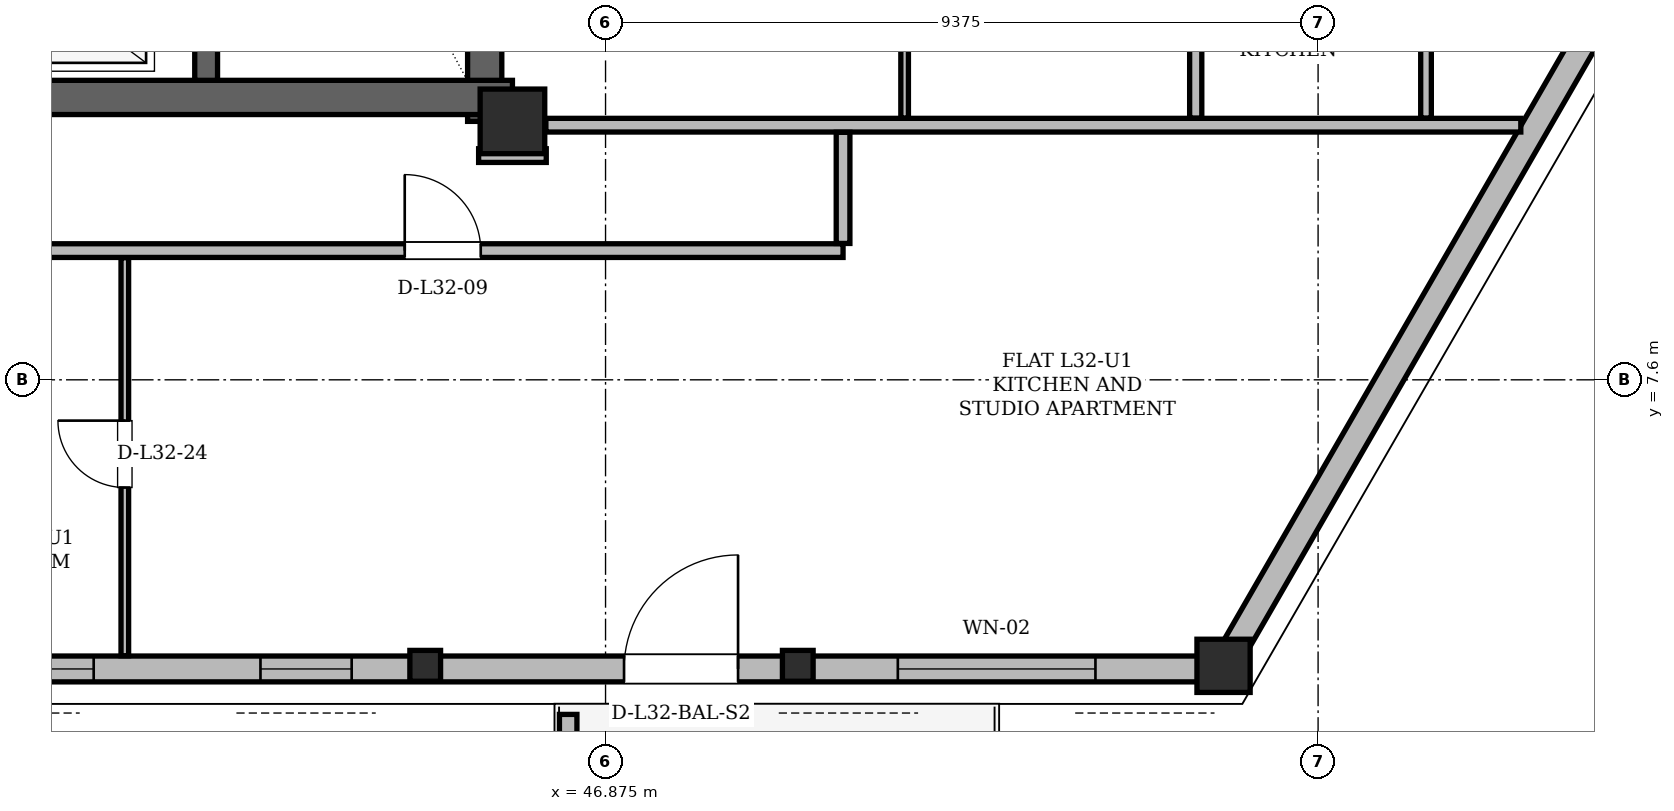
"""IFC4 building model, lengths in metres.
Left out: names, types, materials, properties, quantities, classifications, styles, units other than length and angle.
Written with IfcOpenShell. Run it as: python <this file> out.ifc"""

import sys

from ifc_helpers import new_model, si_unit, direction, frame, frame_2d, origin, origin_2d, place, context, subcontext, project, spatial, polyline, rectangle, hollow_rectangle, i_section, outline, extrude, element, fill, save


model = new_model("IFC4")
c1 = context("Model", 3, precision=1e-05, world=origin(), true_north=direction((0.0, 1.0)))
c2 = subcontext(c1, "Body", "Model", "MODEL_VIEW")
j1 = project(units=[si_unit("LENGTHUNIT", "METRE"), si_unit("PLANEANGLEUNIT", "RADIAN")], contexts=[c1])
p1 = place(None, origin())
s1 = spatial("IfcSite", under=j1, at=p1, CompositionType="ELEMENT")
p2 = place(p1, origin())
s2 = spatial("IfcBuilding", under=s1, at=p2, CompositionType="ELEMENT")
p3 = place(p2, frame((0.0, 0.0, 123.0)))
s3 = spatial("IfcBuildingStorey", under=s2, at=p3, CompositionType="ELEMENT", Elevation=123.0)
p4 = place(p3, frame((45.65, 11.0, 0.0), z_axis=(0.0, 0.0, 1.0), x_axis=(1.0, 0.0, 0.0)))
e1 = element("IfcColumn", 1, at=p4, inside=s3, PredefinedType="COLUMN", context=c2, shape_type="SweptSolid", body=[
    extrude(hollow_rectangle(XDim=0.85, YDim=0.85, WallThickness=0.07, at=origin_2d()), origin(), (0.0, 0.0, 1.0), 3.6),
])
p5 = place(p3, frame((54.988, 3.796, 0.004), z_axis=(0.010194632777, 0.022903941638, 0.999685690065), x_axis=(-0.913587827214, 0.406641466119, 0.0)))
e2 = element("IfcColumn", 2, at=p5, inside=s3, PredefinedType="COLUMN", context=c2, shape_type="SweptSolid", body=[
    extrude(hollow_rectangle(XDim=0.7, YDim=0.7, WallThickness=0.055, at=origin_2d()), origin(), (0.0, 0.0, 1.0), 3.592),
])
for number, where, z_axis, x_axis in (
    (3, (44.495, 3.796, 0.004), (0.004, 0.023, 1.0), (-0.985, 0.175, 0.0)),
    (4, (49.392, 3.796, 0.004), (0.007, 0.023, 1.0), (-0.956, 0.292, 0.0)),
):
    element("IfcColumn", number, at=place(p3, frame(where, z_axis=z_axis, x_axis=x_axis)), inside=s3, PredefinedType="COLUMN", context=c2, shape_type="SweptSolid", body=[
        extrude(i_section(OverallWidth=0.404, OverallDepth=0.406, WebThickness=0.027, FlangeThickness=0.044, at=origin_2d()), origin(), (0.0, 0.0, 1.0), 3.592),
    ])
p6 = place(p3, frame((45.285, 11.0, 0.0), z_axis=(0.0, 0.0, 1.0), x_axis=(0.0, 1.0, 0.0)))
e5 = element("IfcWall", 5, at=p6, inside=s3, PredefinedType="SHEAR", context=c2, shape_type="SweptSolid", body=[
    extrude(rectangle(XDim=13.3, YDim=0.45, at=frame_2d((6.65, 0.0))), origin(), (0.0, 0.0, 1.0), 3.36),
])
p7 = place(p3, frame((38.55, 11.315, 0.0), z_axis=(0.0, 0.0, 1.0), x_axis=(1.0, 0.0, 0.0)))
e6 = element("IfcWall", 6, at=p7, inside=s3, PredefinedType="SHEAR", context=c2, shape_type="SweptSolid", body=[
    extrude(rectangle(XDim=7.1, YDim=0.45, at=frame_2d((3.55, 0.0))), origin(), (0.0, 0.0, 1.0), 3.36),
])
p8 = place(p3, frame((41.62, 11.54, 0.0), z_axis=(0.0, 0.0, 1.0), x_axis=(0.0, 1.0, 0.0)))
e7 = element("IfcWall", 7, at=p8, inside=s3, PredefinedType="SHEAR", context=c2, shape_type="SweptSolid", body=[
    extrude(rectangle(XDim=7.62, YDim=0.3, at=frame_2d((3.81, 0.0))), origin(), (0.0, 0.0, 1.0), 3.36),
])
p9 = place(p3, frame((20.012, 3.796, 0.0), z_axis=(0.0, 0.0, 1.0), x_axis=(1.0, 0.0, 0.0)))
e8 = element("IfcWall", 8, at=p9, inside=s3, PredefinedType="SOLIDWALL", context=c2, shape_type="SweptSolid", body=[
    extrude(rectangle(XDim=34.976, YDim=0.34, at=frame_2d((17.488, 0.0))), origin(), (0.0, 0.0, 1.0), 2.578),
])
p10 = place(p9, frame((8.244, 0.0, 0.0)))
e9 = element("IfcOpeningElement", 9, at=p10, cuts=e8, PredefinedType="OPENING", context=c2, shape_type="SweptSolid", body=[
    extrude(rectangle(XDim=1.5, YDim=2.2, at=frame_2d((0.75, 1.1))), frame((0.0, 0.17, 0.0), z_axis=(0.0, -1.0, 0.0), x_axis=(1.0, 0.0, 0.0)), (0.0, 0.0, 1.0), 0.34),
])
p11 = place(p9, frame((27.106, 0.0, 0.0)))
e10 = element("IfcOpeningElement", 10, at=p11, cuts=e8, PredefinedType="OPENING", context=c2, shape_type="SweptSolid", body=[
    extrude(rectangle(XDim=1.5, YDim=2.2, at=frame_2d((0.75, 1.1))), frame((0.0, 0.17, 0.0), z_axis=(0.0, -1.0, 0.0), x_axis=(1.0, 0.0, 0.0)), (0.0, 0.0, 1.0), 0.34),
])
p12 = place(p9, frame((13.69, 0.0, 0.85)))
e11 = element("IfcOpeningElement", 11, at=p12, cuts=e8, PredefinedType="OPENING", context=c2, shape_type="SweptSolid", body=[
    extrude(rectangle(XDim=1.2, YDim=1.48, at=frame_2d((0.6, 0.74))), frame((0.0, 0.17, 0.0), z_axis=(0.0, -1.0, 0.0), x_axis=(1.0, 0.0, 0.0)), (0.0, 0.0, 1.0), 0.34),
])
p13 = place(p9, frame((16.478, 0.0, 0.85)))
e12 = element("IfcOpeningElement", 12, at=p13, cuts=e8, PredefinedType="OPENING", context=c2, shape_type="SweptSolid", body=[
    extrude(rectangle(XDim=1.2, YDim=1.48, at=frame_2d((0.6, 0.74))), frame((0.0, 0.17, 0.0), z_axis=(0.0, -1.0, 0.0), x_axis=(1.0, 0.0, 0.0)), (0.0, 0.0, 1.0), 0.34),
])
p14 = place(p9, frame((22.323, 0.0, 0.85)))
e13 = element("IfcOpeningElement", 13, at=p14, cuts=e8, PredefinedType="OPENING", context=c2, shape_type="SweptSolid", body=[
    extrude(rectangle(XDim=1.2, YDim=1.48, at=frame_2d((0.6, 0.74))), frame((0.0, 0.17, 0.0), z_axis=(0.0, -1.0, 0.0), x_axis=(1.0, 0.0, 0.0)), (0.0, 0.0, 1.0), 0.34),
])
p15 = place(p9, frame((30.708, 0.0, 0.85)))
e14 = element("IfcOpeningElement", 14, at=p15, cuts=e8, PredefinedType="OPENING", context=c2, shape_type="SweptSolid", body=[
    extrude(rectangle(XDim=2.6, YDim=1.618, at=frame_2d((1.3, 0.809))), frame((0.0, 0.17, 0.0), z_axis=(0.0, -1.0, 0.0), x_axis=(1.0, 0.0, 0.0)), (0.0, 0.0, 1.0), 0.34),
])
p16 = place(p9, frame((18.928, 0.0, 0.85)))
e15 = element("IfcOpeningElement", 15, at=p16, cuts=e8, PredefinedType="OPENING", context=c2, shape_type="SweptSolid", body=[
    extrude(rectangle(XDim=1.2, YDim=1.48, at=frame_2d((0.6, 0.74))), frame((0.0, 0.17, 0.0), z_axis=(0.0, -1.0, 0.0), x_axis=(1.0, 0.0, 0.0)), (0.0, 0.0, 1.0), 0.34),
])
p17 = place(p9, frame((2.32, 0.0, 0.85)))
e16 = element("IfcOpeningElement", 16, at=p17, cuts=e8, PredefinedType="OPENING", context=c2, shape_type="SweptSolid", body=[
    extrude(rectangle(XDim=1.2, YDim=1.48, at=frame_2d((0.6, 0.74))), frame((0.0, 0.17, 0.0), z_axis=(0.0, -1.0, 0.0), x_axis=(1.0, 0.0, 0.0)), (0.0, 0.0, 1.0), 0.34),
])
p18 = place(p9, frame((6.782, 0.0, 0.85)))
e17 = element("IfcOpeningElement", 17, at=p18, cuts=e8, PredefinedType="OPENING", context=c2, shape_type="SweptSolid", body=[
    extrude(rectangle(XDim=1.2, YDim=1.48, at=frame_2d((0.6, 0.74))), frame((0.0, 0.17, 0.0), z_axis=(0.0, -1.0, 0.0), x_axis=(1.0, 0.0, 0.0)), (0.0, 0.0, 1.0), 0.34),
])
p19 = place(p9, frame((11.343, 0.0, 0.85)))
e18 = element("IfcOpeningElement", 18, at=p19, cuts=e8, PredefinedType="OPENING", context=c2, shape_type="SweptSolid", body=[
    extrude(rectangle(XDim=1.6, YDim=1.618, at=frame_2d((0.8, 0.809))), frame((0.0, 0.17, 0.0), z_axis=(0.0, -1.0, 0.0), x_axis=(1.0, 0.0, 0.0)), (0.0, 0.0, 1.0), 0.34),
])
p20 = place(p3, frame((54.988, 3.796, 0.0), z_axis=(0.0, 0.0, 1.0), x_axis=(0.500010095722, 0.866019574938, 0.0)))
e19 = element("IfcWall", 19, at=p20, inside=s3, PredefinedType="SOLIDWALL", context=c2, shape_type="SweptSolid", body=[
    extrude(rectangle(XDim=10.751, YDim=0.34, at=frame_2d((5.375, 0.0))), origin(), (0.0, 0.0, 1.0), 2.578),
])
p21 = place(p3, frame((46.383, 3.198, 0.0), z_axis=(0.0, 0.0, 1.0), x_axis=(0.0, -1.0, 0.0)))
e20 = element("IfcWall", 20, at=p21, inside=s3, PredefinedType="PARAPET", context=c2, shape_type="SweptSolid", body=[
    extrude(outline(polyline([(0.0, 0.0), (2.042, 0.0), (2.042, 1.1), (0.0, 1.32), (0.0, 0.0)])), frame((0.0, 0.115, 0.0), z_axis=(0.0, -1.0, 0.0), x_axis=(1.0, 0.0, 0.0)), (0.0, 0.0, 1.0), 0.23),
])
p22 = place(p3, frame((19.6, 9.3, 0.0), z_axis=(0.0, 0.0, 1.0), x_axis=(1.0, 0.0, 0.0)))
e21 = element("IfcWall", 21, at=p22, inside=s3, PredefinedType="PARTITIONING", context=c2, shape_type="SweptSolid", body=[
    extrude(rectangle(XDim=30.4, YDim=0.18, at=frame_2d((15.2, 0.0))), origin(), (0.0, 0.0, 1.0), 2.814),
])
p23 = place(p22, frame((6.121, 0.0, 0.0)))
e22 = element("IfcOpeningElement", 22, at=p23, cuts=e21, PredefinedType="OPENING", context=c2, shape_type="SweptSolid", body=[
    extrude(rectangle(XDim=1.0, YDim=2.18, at=frame_2d((0.5, 1.09))), frame((0.0, 0.09, 0.0), z_axis=(0.0, -1.0, 0.0), x_axis=(1.0, 0.0, 0.0)), (0.0, 0.0, 1.0), 0.18),
])
p24 = place(p22, frame((15.05, 0.0, 0.0)))
e23 = element("IfcOpeningElement", 23, at=p24, cuts=e21, PredefinedType="OPENING", context=c2, shape_type="SweptSolid", body=[
    extrude(rectangle(XDim=1.3, YDim=2.2, at=frame_2d((0.65, 1.1))), frame((0.0, 0.09, 0.0), z_axis=(0.0, -1.0, 0.0), x_axis=(1.0, 0.0, 0.0)), (0.0, 0.0, 1.0), 0.18),
])
p25 = place(p22, frame((24.633, 0.0, 0.0)))
e24 = element("IfcOpeningElement", 24, at=p25, cuts=e21, PredefinedType="OPENING", context=c2, shape_type="SweptSolid", body=[
    extrude(rectangle(XDim=1.0, YDim=2.18, at=frame_2d((0.5, 1.09))), frame((0.0, 0.09, 0.0), z_axis=(0.0, -1.0, 0.0), x_axis=(1.0, 0.0, 0.0)), (0.0, 0.0, 1.0), 0.18),
])
p26 = place(p3, frame((45.205, 10.55, 0.0), z_axis=(0.0, 0.0, 1.0), x_axis=(1.0, 0.0, 0.0)))
e25 = element("IfcWall", 25, at=p26, inside=s3, PredefinedType="PARTITIONING", context=c2, shape_type="SweptSolid", body=[
    extrude(rectangle(XDim=0.89, YDim=0.18, at=frame_2d((0.445, 0.0))), origin(), (0.0, 0.0, 1.0), 3.36),
])
p27 = place(p3, frame((46.09, 10.95, 0.0), z_axis=(0.0, 0.0, 1.0), x_axis=(1.0, 0.0, 0.0)))
e26 = element("IfcWall", 26, at=p27, inside=s3, PredefinedType="PARTITIONING", context=c2, shape_type="SweptSolid", body=[
    extrude(rectangle(XDim=12.827, YDim=0.18, at=frame_2d((6.414, 0.0))), origin(), (0.0, 0.0, 1.0), 2.814),
])
p28 = place(p3, frame((40.55, 3.97, 0.0), z_axis=(0.0, 0.0, 1.0), x_axis=(0.0, 1.0, 0.0)))
e27 = element("IfcWall", 27, at=p28, inside=s3, PredefinedType="PARTITIONING", context=c2, shape_type="SweptSolid", body=[
    extrude(rectangle(XDim=5.236, YDim=0.1, at=frame_2d((2.618, 0.0))), origin(), (0.0, 0.0, 1.0), 3.36),
])
p29 = place(p28, frame((2.213, 0.0, 0.0)))
e28 = element("IfcOpeningElement", 28, at=p29, cuts=e27, PredefinedType="OPENING", context=c2, shape_type="SweptSolid", body=[
    extrude(rectangle(XDim=0.88, YDim=2.08, at=frame_2d((0.44, 1.04))), frame((0.0, 0.05, 0.0), z_axis=(0.0, -1.0, 0.0), x_axis=(1.0, 0.0, 0.0)), (0.0, 0.0, 1.0), 0.1),
])
p30 = place(p3, frame((50.0, 9.394, 0.0), z_axis=(0.0, 0.0, 1.0), x_axis=(0.0, 1.0, 0.0)))
e29 = element("IfcWall", 29, at=p30, inside=s3, PredefinedType="PARTITIONING", context=c2, shape_type="SweptSolid", body=[
    extrude(rectangle(XDim=1.462, YDim=0.18, at=frame_2d((0.731, 0.0))), origin(), (0.0, 0.0, 1.0), 3.36),
])
p31 = place(p3, frame((50.81, 11.044, 0.0), z_axis=(0.0, 0.0, 1.0), x_axis=(0.0, 1.0, 0.0)))
e30 = element("IfcWall", 30, at=p31, inside=s3, PredefinedType="PARTITIONING", context=c2, shape_type="SweptSolid", body=[
    extrude(rectangle(XDim=3.082, YDim=0.1, at=frame_2d((1.541, 0.0))), origin(), (0.0, 0.0, 1.0), 2.814),
])
p32 = place(p3, frame((54.64, 11.044, 0.0), z_axis=(0.0, 0.0, 1.0), x_axis=(0.0, 1.0, 0.0)))
e31 = element("IfcWall", 31, at=p32, inside=s3, PredefinedType="PARTITIONING", context=c2, shape_type="SweptSolid", body=[
    extrude(rectangle(XDim=3.082, YDim=0.16, at=frame_2d((1.541, 0.0))), origin(), (0.0, 0.0, 1.0), 2.814),
])
p33 = place(p3, frame((57.67, 11.044, 0.0), z_axis=(0.0, 0.0, 1.0), x_axis=(0.0, 1.0, 0.0)))
e32 = element("IfcWall", 32, at=p33, inside=s3, PredefinedType="PARTITIONING", context=c2, shape_type="SweptSolid", body=[
    extrude(rectangle(XDim=3.082, YDim=0.14, at=frame_2d((1.541, 0.0))), origin(), (0.0, 0.0, 1.0), 2.814),
])
p34 = place(p11, origin())
e33 = element("IfcDoor", 33, at=p34, inside=s3, OperationType="SINGLE_SWING_RIGHT", PredefinedType="DOOR", context=c2, shape_type="SweptSolid", body=[
    extrude(rectangle(XDim=1.5, YDim=2.2, at=frame_2d((0.75, 1.1))), frame((0.0, 0.025, 0.0), z_axis=(0.0, -1.0, 0.0), x_axis=(1.0, 0.0, 0.0)), (0.0, 0.0, 1.0), 0.05),
])
fill(e10, e33)
p35 = place(p14, origin())
e34 = element("IfcWindow", 34, at=p35, inside=s3, PartitioningType="SINGLE_PANEL", PredefinedType="WINDOW", context=c2, shape_type="SweptSolid", body=[
    extrude(rectangle(XDim=1.2, YDim=1.48, at=frame_2d((0.6, 0.74))), frame((0.0, 0.03, 0.0), z_axis=(0.0, -1.0, 0.0), x_axis=(1.0, 0.0, 0.0)), (0.0, 0.0, 1.0), 0.06),
])
fill(e13, e34)
p36 = place(p15, origin())
e35 = element("IfcWindow", 35, at=p36, inside=s3, PartitioningType="SINGLE_PANEL", PredefinedType="WINDOW", context=c2, shape_type="SweptSolid", body=[
    extrude(rectangle(XDim=2.6, YDim=1.618, at=frame_2d((1.3, 0.809))), frame((0.0, 0.03, 0.0), z_axis=(0.0, -1.0, 0.0), x_axis=(1.0, 0.0, 0.0)), (0.0, 0.0, 1.0), 0.06),
])
fill(e14, e35)
p37 = place(p16, origin())
e36 = element("IfcWindow", 36, at=p37, inside=s3, PartitioningType="SINGLE_PANEL", PredefinedType="WINDOW", context=c2, shape_type="SweptSolid", body=[
    extrude(rectangle(XDim=1.2, YDim=1.48, at=frame_2d((0.6, 0.74))), frame((0.0, 0.03, 0.0), z_axis=(0.0, -1.0, 0.0), x_axis=(1.0, 0.0, 0.0)), (0.0, 0.0, 1.0), 0.06),
])
fill(e15, e36)
p38 = place(p25, origin())
e37 = element("IfcDoor", 37, at=p38, inside=s3, OperationType="SINGLE_SWING_LEFT", PredefinedType="DOOR", context=c2, shape_type="SweptSolid", body=[
    extrude(rectangle(XDim=1.0, YDim=2.18, at=frame_2d((0.5, 1.09))), frame((0.0, 0.025, 0.0), z_axis=(0.0, -1.0, 0.0), x_axis=(1.0, 0.0, 0.0)), (0.0, 0.0, 1.0), 0.05),
])
fill(e24, e37)
p39 = place(p29, origin())
e38 = element("IfcDoor", 38, at=p39, inside=s3, OperationType="SINGLE_SWING_RIGHT", PredefinedType="DOOR", context=c2, shape_type="SweptSolid", body=[
    extrude(rectangle(XDim=0.88, YDim=2.08, at=frame_2d((0.44, 1.04))), frame((0.0, 0.025, 0.0), z_axis=(0.0, -1.0, 0.0), x_axis=(1.0, 0.0, 0.0)), (0.0, 0.0, 1.0), 0.05),
])
fill(e28, e38)
save(model, sys.argv[1])
